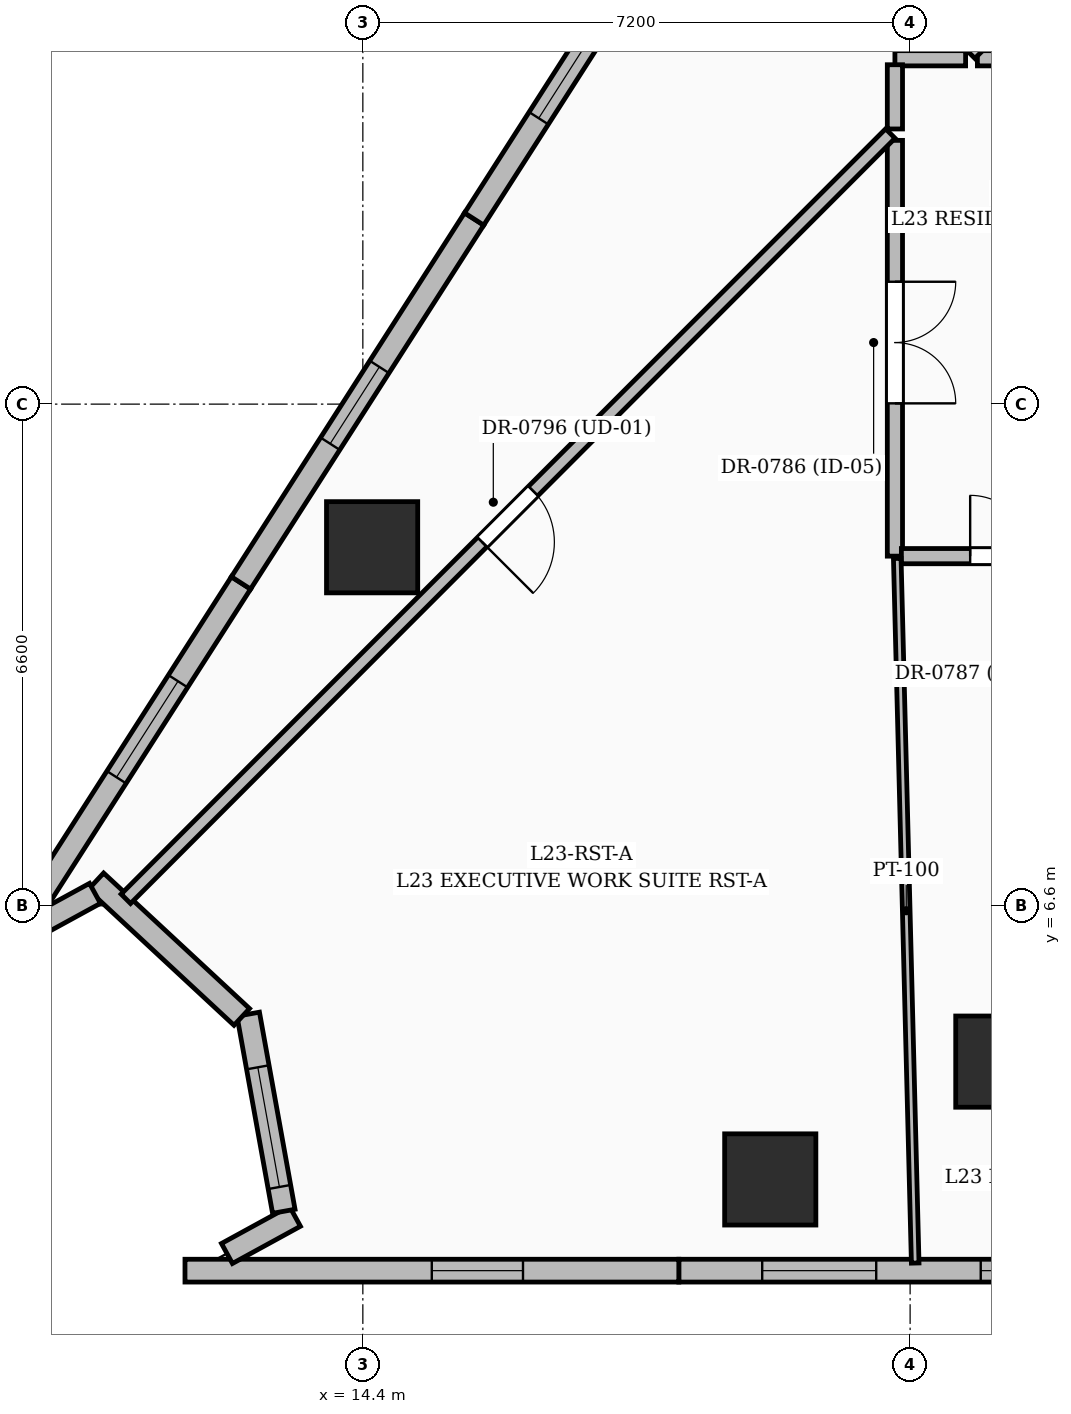
"""IFC4 building model, lengths in metres.
Left out: names, types, materials, properties, quantities, classifications, styles, units other than length and angle.
Written with IfcOpenShell. Run it as: python <this file> out.ifc"""

import sys

from ifc_helpers import new_model, si_unit, direction, frame, frame_2d, origin, origin_2d, place, context, subcontext, project, spatial, rectangle, extrude, element, fill, save


model = new_model("IFC4")
c1 = context("Model", 3, precision=1e-05, world=origin(), true_north=direction((0.0, 1.0)))
c2 = subcontext(c1, "Body", "Model", "MODEL_VIEW")
j1 = project(units=[si_unit("LENGTHUNIT", "METRE"), si_unit("PLANEANGLEUNIT", "RADIAN")], contexts=[c1])
p1 = place(None, origin())
s1 = spatial("IfcSite", under=j1, at=p1, CompositionType="ELEMENT")
p2 = place(p1, origin())
s2 = spatial("IfcBuilding", under=s1, at=p2, CompositionType="ELEMENT")
p3 = place(p2, frame((0.0, 0.0, 93.0)))
s3 = spatial("IfcBuildingStorey", under=s2, at=p3, CompositionType="ELEMENT", Elevation=93.0)
for number, where, z_axis, x_axis in (
    (1, (22.8, 4.55, 0.0), (0.0, 0.0, 1.0), (1.0, 0.0, 0.0)),
    (2, (19.76, 3.0, 0.0), (0.0, 0.0, 1.0), (1.0, 0.0, 0.0)),
    (3, (14.522, 11.317, 0.0), (0.0, 0.0, 1.0), (1.0, 0.0, 0.0)),
):
    element("IfcColumn", number, at=place(p3, frame(where, z_axis=z_axis, x_axis=x_axis)), inside=s3, PredefinedType="COLUMN", context=c2, shape_type="SweptSolid", body=[
        extrude(rectangle(XDim=1.2, YDim=1.2, at=origin_2d()), origin(), (0.0, 0.0, 1.0), 3.6),
    ])
p4 = place(p3, frame((25.054, 1.8, 0.0), z_axis=(0.0, 0.0, 1.0), x_axis=(-1.0, 0.0, 0.0)))
e4 = element("IfcWall", 4, at=p4, inside=s3, PredefinedType="SOLIDWALL", context=c2, shape_type="SweptSolid", body=[
    extrude(rectangle(XDim=6.497, YDim=0.3, at=frame_2d((3.249, 0.0))), origin(), (0.0, 0.0, 1.0), 3.35),
])
p5 = place(p4, frame((3.9, 0.0, 0.6)))
e5 = element("IfcOpeningElement", 5, at=p5, cuts=e4, PredefinedType="OPENING", context=c2, shape_type="SweptSolid", body=[
    extrude(rectangle(XDim=1.5, YDim=2.1, at=frame_2d((0.75, 1.05))), frame((0.0, 0.16, 0.0), z_axis=(0.0, -1.0, 0.0), x_axis=(1.0, 0.0, 0.0)), (0.0, 0.0, 1.0), 0.32),
])
p6 = place(p4, frame((1.025, 0.0, 0.6)))
e6 = element("IfcOpeningElement", 6, at=p6, cuts=e4, PredefinedType="OPENING", context=c2, shape_type="SweptSolid", body=[
    extrude(rectangle(XDim=1.5, YDim=2.1, at=frame_2d((0.75, 1.05))), frame((0.0, 0.16, 0.0), z_axis=(0.0, -1.0, 0.0), x_axis=(1.0, 0.0, 0.0)), (0.0, 0.0, 1.0), 0.32),
])
p7 = place(p3, frame((18.557, 1.8, 0.0), z_axis=(0.0, 0.0, 1.0), x_axis=(-1.0, 0.0, 0.0)))
e7 = element("IfcWall", 7, at=p7, inside=s3, PredefinedType="SOLIDWALL", context=c2, shape_type="SweptSolid", body=[
    extrude(rectangle(XDim=6.497, YDim=0.3, at=frame_2d((3.249, 0.0))), origin(), (0.0, 0.0, 1.0), 3.35),
])
p8 = place(p7, frame((2.05, 0.0, 0.8)))
e8 = element("IfcOpeningElement", 8, at=p8, cuts=e7, PredefinedType="OPENING", context=c2, shape_type="SweptSolid", body=[
    extrude(rectangle(XDim=1.2, YDim=1.8, at=frame_2d((0.6, 0.9))), frame((0.0, 0.16, 0.0), z_axis=(0.0, -1.0, 0.0), x_axis=(1.0, 0.0, 0.0)), (0.0, 0.0, 1.0), 0.32),
])
p9 = place(p3, frame((12.612, 2.026, 0.0), z_axis=(0.0, 0.0, 1.0), x_axis=(0.877245120991, 0.480042704036, 0.0)))
e9 = element("IfcWall", 9, at=p9, inside=s3, PredefinedType="SOLIDWALL", context=c2, shape_type="SweptSolid", body=[
    extrude(rectangle(XDim=1.02, YDim=0.3, at=frame_2d((0.51, 0.0))), origin(), (0.0, 0.0, 1.0), 3.35),
])
p10 = place(p3, frame((13.36, 2.581, 0.0), z_axis=(0.0, 0.0, 1.0), x_axis=(-0.177621463404, 0.984098885142, 0.0)))
e10 = element("IfcWall", 10, at=p10, inside=s3, PredefinedType="SOLIDWALL", context=c2, shape_type="SweptSolid", body=[
    extrude(rectangle(XDim=2.635, YDim=0.3, at=frame_2d((1.317, 0.0))), origin(), (0.0, 0.0, 1.0), 3.35),
])
p11 = place(p10, frame((0.325, 0.0, 0.55)))
e11 = element("IfcOpeningElement", 11, at=p11, cuts=e10, PredefinedType="OPENING", context=c2, shape_type="SweptSolid", body=[
    extrude(rectangle(XDim=1.6, YDim=2.2, at=frame_2d((0.8, 1.1))), frame((0.0, 0.16, 0.0), z_axis=(0.0, -1.0, 0.0), x_axis=(1.0, 0.0, 0.0)), (0.0, 0.0, 1.0), 0.32),
])
p12 = place(p3, frame((12.807, 5.138, 0.0), z_axis=(0.0, 0.0, 1.0), x_axis=(-0.732670686937, 0.680583326642, 0.0)))
e12 = element("IfcWall", 12, at=p12, inside=s3, PredefinedType="SOLIDWALL", context=c2, shape_type="SweptSolid", body=[
    extrude(rectangle(XDim=2.62, YDim=0.3, at=frame_2d((1.31, 0.0))), origin(), (0.0, 0.0, 1.0), 3.35),
])
p13 = place(p3, frame((10.876, 6.764, 0.0), z_axis=(0.0, 0.0, 1.0), x_axis=(-0.877387661902, -0.47978212841, 0.0)))
e13 = element("IfcWall", 13, at=p13, inside=s3, PredefinedType="SOLIDWALL", context=c2, shape_type="SweptSolid", body=[
    extrude(rectangle(XDim=1.361, YDim=0.3, at=frame_2d((0.68, 0.0))), origin(), (0.0, 0.0, 1.0), 3.35),
])
p14 = place(p3, frame((10.061, 6.578, 0.0), z_axis=(0.0, 0.0, 1.0), x_axis=(0.539464859434, 0.842008114828, 0.0)))
e14 = element("IfcWall", 14, at=p14, inside=s3, PredefinedType="SOLIDWALL", context=c2, shape_type="SweptSolid", body=[
    extrude(rectangle(XDim=5.071, YDim=0.3, at=frame_2d((2.536, 0.0))), origin(), (0.0, 0.0, 1.0), 3.35),
])
p15 = place(p14, frame((2.035, 0.0, 0.6)))
e15 = element("IfcOpeningElement", 15, at=p15, cuts=e14, PredefinedType="OPENING", context=c2, shape_type="SweptSolid", body=[
    extrude(rectangle(XDim=1.5, YDim=2.1, at=frame_2d((0.75, 1.05))), frame((0.0, 0.16, 0.0), z_axis=(0.0, -1.0, 0.0), x_axis=(1.0, 0.0, 0.0)), (0.0, 0.0, 1.0), 0.32),
])
p16 = place(p3, frame((12.797, 10.848, 0.0), z_axis=(0.0, 0.0, 1.0), x_axis=(0.539467898562, 0.842006167686, 0.0)))
e16 = element("IfcWall", 16, at=p16, inside=s3, PredefinedType="SOLIDWALL", context=c2, shape_type="SweptSolid", body=[
    extrude(rectangle(XDim=5.686, YDim=0.3, at=frame_2d((2.843, 0.0))), origin(), (0.0, 0.0, 1.0), 3.35),
])
p17 = place(p16, frame((2.175, 0.0, 0.8)))
e17 = element("IfcOpeningElement", 17, at=p17, cuts=e16, PredefinedType="OPENING", context=c2, shape_type="SweptSolid", body=[
    extrude(rectangle(XDim=1.2, YDim=1.8, at=frame_2d((0.6, 0.9))), frame((0.0, 0.16, 0.0), z_axis=(0.0, -1.0, 0.0), x_axis=(1.0, 0.0, 0.0)), (0.0, 0.0, 1.0), 0.32),
])
p18 = place(p3, frame((15.864, 15.635, 0.0), z_axis=(0.0, 0.0, 1.0), x_axis=(0.53944798429, 0.842018926299, 0.0)))
e18 = element("IfcWall", 18, at=p18, inside=s3, PredefinedType="SOLIDWALL", context=c2, shape_type="SweptSolid", body=[
    extrude(rectangle(XDim=5.411, YDim=0.3, at=frame_2d((2.706, 0.0))), origin(), (0.0, 0.0, 1.0), 3.35),
])
p19 = place(p18, frame((1.575, 0.0, 0.6)))
e19 = element("IfcOpeningElement", 19, at=p19, cuts=e18, PredefinedType="OPENING", context=c2, shape_type="SweptSolid", body=[
    extrude(rectangle(XDim=2.4, YDim=2.1, at=frame_2d((1.2, 1.05))), frame((0.0, 0.16, 0.0), z_axis=(0.0, -1.0, 0.0), x_axis=(1.0, 0.0, 0.0)), (0.0, 0.0, 1.0), 0.32),
])
p20 = place(p3, frame((21.4, 16.67, 0.0), z_axis=(0.0, 0.0, 1.0), x_axis=(0.0, -1.0, 0.0)))
e20 = element("IfcWall", 20, at=p20, inside=s3, PredefinedType="PARTITIONING", context=c2, shape_type="SweptSolid", body=[
    extrude(rectangle(XDim=5.47, YDim=0.2, at=frame_2d((2.735, 0.0))), origin(), (0.0, 0.0, 1.0), 2.787),
])
p21 = place(p20, frame((1.86, 0.0, 0.0)))
e21 = element("IfcOpeningElement", 21, at=p21, cuts=e20, PredefinedType="OPENING", context=c2, shape_type="SweptSolid", body=[
    extrude(rectangle(XDim=1.6, YDim=2.3, at=frame_2d((0.8, 1.15))), frame((0.0, 0.11, 0.0), z_axis=(0.0, -1.0, 0.0), x_axis=(1.0, 0.0, 0.0)), (0.0, 0.0, 1.0), 0.22),
])
p22 = place(p3, frame((21.485, 11.2, 0.0), z_axis=(0.0, 0.0, 1.0), x_axis=(1.0, 0.0, 0.0)))
e22 = element("IfcWall", 22, at=p22, inside=s3, PredefinedType="PARTITIONING", context=c2, shape_type="SweptSolid", body=[
    extrude(rectangle(XDim=3.384, YDim=0.2, at=frame_2d((1.692, 0.0))), origin(), (0.0, 0.0, 1.0), 3.35),
])
p23 = place(p22, frame((0.905, 0.0, 0.0)))
e23 = element("IfcOpeningElement", 23, at=p23, cuts=e22, PredefinedType="OPENING", context=c2, shape_type="SweptSolid", body=[
    extrude(rectangle(XDim=1.6, YDim=2.3, at=frame_2d((0.8, 1.15))), frame((0.0, 0.11, 0.0), z_axis=(0.0, -1.0, 0.0), x_axis=(1.0, 0.0, 0.0)), (0.0, 0.0, 1.0), 0.22),
])
p24 = place(p3, frame((22.33, 17.75, 0.0), z_axis=(0.0, 0.0, 1.0), x_axis=(-1.0, 0.0, 0.0)))
e24 = element("IfcWall", 24, at=p24, inside=s3, PredefinedType="PARTITIONING", context=c2, shape_type="SweptSolid", body=[
    extrude(rectangle(XDim=0.93, YDim=0.2, at=frame_2d((0.465, 0.0))), origin(), (0.0, 0.0, 1.0), 2.787),
])
p25 = place(p3, frame((21.4, 17.665, 0.0), z_axis=(0.0, 0.0, 1.0), x_axis=(0.0, -1.0, 0.0)))
e25 = element("IfcWall", 25, at=p25, inside=s3, PredefinedType="PARTITIONING", context=c2, shape_type="SweptSolid", body=[
    extrude(rectangle(XDim=0.845, YDim=0.2, at=frame_2d((0.422, 0.0))), origin(), (0.0, 0.0, 1.0), 2.787),
])
p26 = place(p3, frame((29.95, 17.75, 0.0), z_axis=(0.0, 0.0, 1.0), x_axis=(-1.0, 0.0, 0.0)))
e26 = element("IfcWall", 26, at=p26, inside=s3, PredefinedType="PARTITIONING", context=c2, shape_type="SweptSolid", body=[
    extrude(rectangle(XDim=7.465, YDim=0.2, at=frame_2d((3.732, 0.0))), origin(), (0.0, 0.0, 1.0), 2.345),
])
p27 = place(p26, frame((3.01, 0.0, 0.0)))
e27 = element("IfcOpeningElement", 27, at=p27, cuts=e26, PredefinedType="OPENING", context=c2, shape_type="SweptSolid", body=[
    extrude(rectangle(XDim=1.6, YDim=2.3, at=frame_2d((0.8, 1.15))), frame((0.0, 0.11, 0.0), z_axis=(0.0, -1.0, 0.0), x_axis=(1.0, 0.0, 0.0)), (0.0, 0.0, 1.0), 0.22),
])
p28 = place(p3, frame((21.667, 1.9, 0.0), z_axis=(0.0, 0.0, 1.0), x_axis=(-0.025459219334, 0.999675861543, 0.0)))
e28 = element("IfcWall", 28, at=p28, inside=s3, PredefinedType="PARTITIONING", context=c2, shape_type="SweptSolid", body=[
    extrude(rectangle(XDim=9.273, YDim=0.1, at=frame_2d((4.636, 0.0))), origin(), (0.0, 0.0, 1.0), 2.345),
])
p29 = place(p3, frame((21.34, 16.76, 0.0), z_axis=(0.0, 0.0, 1.0), x_axis=(-0.70674642835, -0.707466950475, 0.0)))
e29 = element("IfcWall", 29, at=p29, inside=s3, PredefinedType="PARTITIONING", context=c2, shape_type="SweptSolid", body=[
    extrude(rectangle(XDim=14.231, YDim=0.175, at=frame_2d((7.116, 0.0))), origin(), (0.0, 0.0, 1.0), 2.345),
])
p30 = place(p29, frame((6.648, 0.0, 0.0)))
e30 = element("IfcOpeningElement", 30, at=p30, cuts=e29, PredefinedType="OPENING", context=c2, shape_type="SweptSolid", body=[
    extrude(rectangle(XDim=0.95, YDim=2.2, at=frame_2d((0.475, 1.1))), frame((0.0, 0.097, 0.0), z_axis=(0.0, -1.0, 0.0), x_axis=(1.0, 0.0, 0.0)), (0.0, 0.0, 1.0), 0.195),
])
p31 = place(p3, frame((22.39, 17.81, 0.0), z_axis=(0.0, 0.0, 1.0), x_axis=(0.707093622896, 0.707119939232, 0.0)))
e31 = element("IfcWall", 31, at=p31, inside=s3, PredefinedType="PARTITIONING", context=c2, shape_type="SweptSolid", body=[
    extrude(rectangle(XDim=9.277, YDim=0.175, at=frame_2d((4.639, 0.0))), origin(), (0.0, 0.0, 1.0), 2.345),
])
p32 = place(p5, origin())
e32 = element("IfcWindow", 32, at=p32, inside=s3, PartitioningType="SINGLE_PANEL", PredefinedType="WINDOW", context=c2, shape_type="SweptSolid", body=[
    extrude(rectangle(XDim=1.5, YDim=2.1, at=frame_2d((0.75, 1.05))), frame((0.0, 0.03, 0.0), z_axis=(0.0, -1.0, 0.0), x_axis=(1.0, 0.0, 0.0)), (0.0, 0.0, 1.0), 0.06),
])
fill(e5, e32)
p33 = place(p6, origin())
e33 = element("IfcWindow", 33, at=p33, inside=s3, PartitioningType="SINGLE_PANEL", PredefinedType="WINDOW", context=c2, shape_type="SweptSolid", body=[
    extrude(rectangle(XDim=1.5, YDim=2.1, at=frame_2d((0.75, 1.05))), frame((0.0, 0.03, 0.0), z_axis=(0.0, -1.0, 0.0), x_axis=(1.0, 0.0, 0.0)), (0.0, 0.0, 1.0), 0.06),
])
fill(e6, e33)
p34 = place(p8, origin())
e34 = element("IfcWindow", 34, at=p34, inside=s3, PartitioningType="SINGLE_PANEL", PredefinedType="WINDOW", context=c2, shape_type="SweptSolid", body=[
    extrude(rectangle(XDim=1.2, YDim=1.8, at=frame_2d((0.6, 0.9))), frame((0.0, 0.03, 0.0), z_axis=(0.0, -1.0, 0.0), x_axis=(1.0, 0.0, 0.0)), (0.0, 0.0, 1.0), 0.06),
])
fill(e8, e34)
p35 = place(p11, origin())
e35 = element("IfcWindow", 35, at=p35, inside=s3, PartitioningType="SINGLE_PANEL", PredefinedType="WINDOW", context=c2, shape_type="SweptSolid", body=[
    extrude(rectangle(XDim=1.6, YDim=2.2, at=frame_2d((0.8, 1.1))), frame((0.0, 0.03, 0.0), z_axis=(0.0, -1.0, 0.0), x_axis=(1.0, 0.0, 0.0)), (0.0, 0.0, 1.0), 0.06),
])
fill(e11, e35)
p36 = place(p15, origin())
e36 = element("IfcWindow", 36, at=p36, inside=s3, PartitioningType="SINGLE_PANEL", PredefinedType="WINDOW", context=c2, shape_type="SweptSolid", body=[
    extrude(rectangle(XDim=1.5, YDim=2.1, at=frame_2d((0.75, 1.05))), frame((0.0, 0.03, 0.0), z_axis=(0.0, -1.0, 0.0), x_axis=(1.0, 0.0, 0.0)), (0.0, 0.0, 1.0), 0.06),
])
fill(e15, e36)
p37 = place(p17, origin())
e37 = element("IfcWindow", 37, at=p37, inside=s3, PartitioningType="SINGLE_PANEL", PredefinedType="WINDOW", context=c2, shape_type="SweptSolid", body=[
    extrude(rectangle(XDim=1.2, YDim=1.8, at=frame_2d((0.6, 0.9))), frame((0.0, 0.03, 0.0), z_axis=(0.0, -1.0, 0.0), x_axis=(1.0, 0.0, 0.0)), (0.0, 0.0, 1.0), 0.06),
])
fill(e17, e37)
p38 = place(p19, origin())
e38 = element("IfcWindow", 38, at=p38, inside=s3, PartitioningType="SINGLE_PANEL", PredefinedType="WINDOW", context=c2, shape_type="SweptSolid", body=[
    extrude(rectangle(XDim=2.4, YDim=2.1, at=frame_2d((1.2, 1.05))), frame((0.0, 0.03, 0.0), z_axis=(0.0, -1.0, 0.0), x_axis=(1.0, 0.0, 0.0)), (0.0, 0.0, 1.0), 0.06),
])
fill(e19, e38)
p39 = place(p21, origin())
e39 = element("IfcDoor", 39, at=p39, inside=s3, OperationType="DOUBLE_DOOR_SINGLE_SWING", PredefinedType="DOOR", context=c2, shape_type="SweptSolid", body=[
    extrude(rectangle(XDim=1.6, YDim=2.3, at=frame_2d((0.8, 1.15))), frame((0.0, 0.025, 0.0), z_axis=(0.0, -1.0, 0.0), x_axis=(1.0, 0.0, 0.0)), (0.0, 0.0, 1.0), 0.05),
])
fill(e21, e39)
p40 = place(p23, origin())
e40 = element("IfcDoor", 40, at=p40, inside=s3, OperationType="DOUBLE_DOOR_SINGLE_SWING", PredefinedType="DOOR", context=c2, shape_type="SweptSolid", body=[
    extrude(rectangle(XDim=1.6, YDim=2.3, at=frame_2d((0.8, 1.15))), frame((0.0, 0.025, 0.0), z_axis=(0.0, -1.0, 0.0), x_axis=(1.0, 0.0, 0.0)), (0.0, 0.0, 1.0), 0.05),
])
fill(e23, e40)
p41 = place(p30, origin())
e41 = element("IfcDoor", 41, at=p41, inside=s3, OperationType="SINGLE_SWING_RIGHT", PredefinedType="DOOR", context=c2, shape_type="SweptSolid", body=[
    extrude(rectangle(XDim=0.95, YDim=2.2, at=frame_2d((0.475, 1.1))), frame((0.0, 0.025, 0.0), z_axis=(0.0, -1.0, 0.0), x_axis=(1.0, 0.0, 0.0)), (0.0, 0.0, 1.0), 0.05),
])
fill(e30, e41)
save(model, sys.argv[1])
